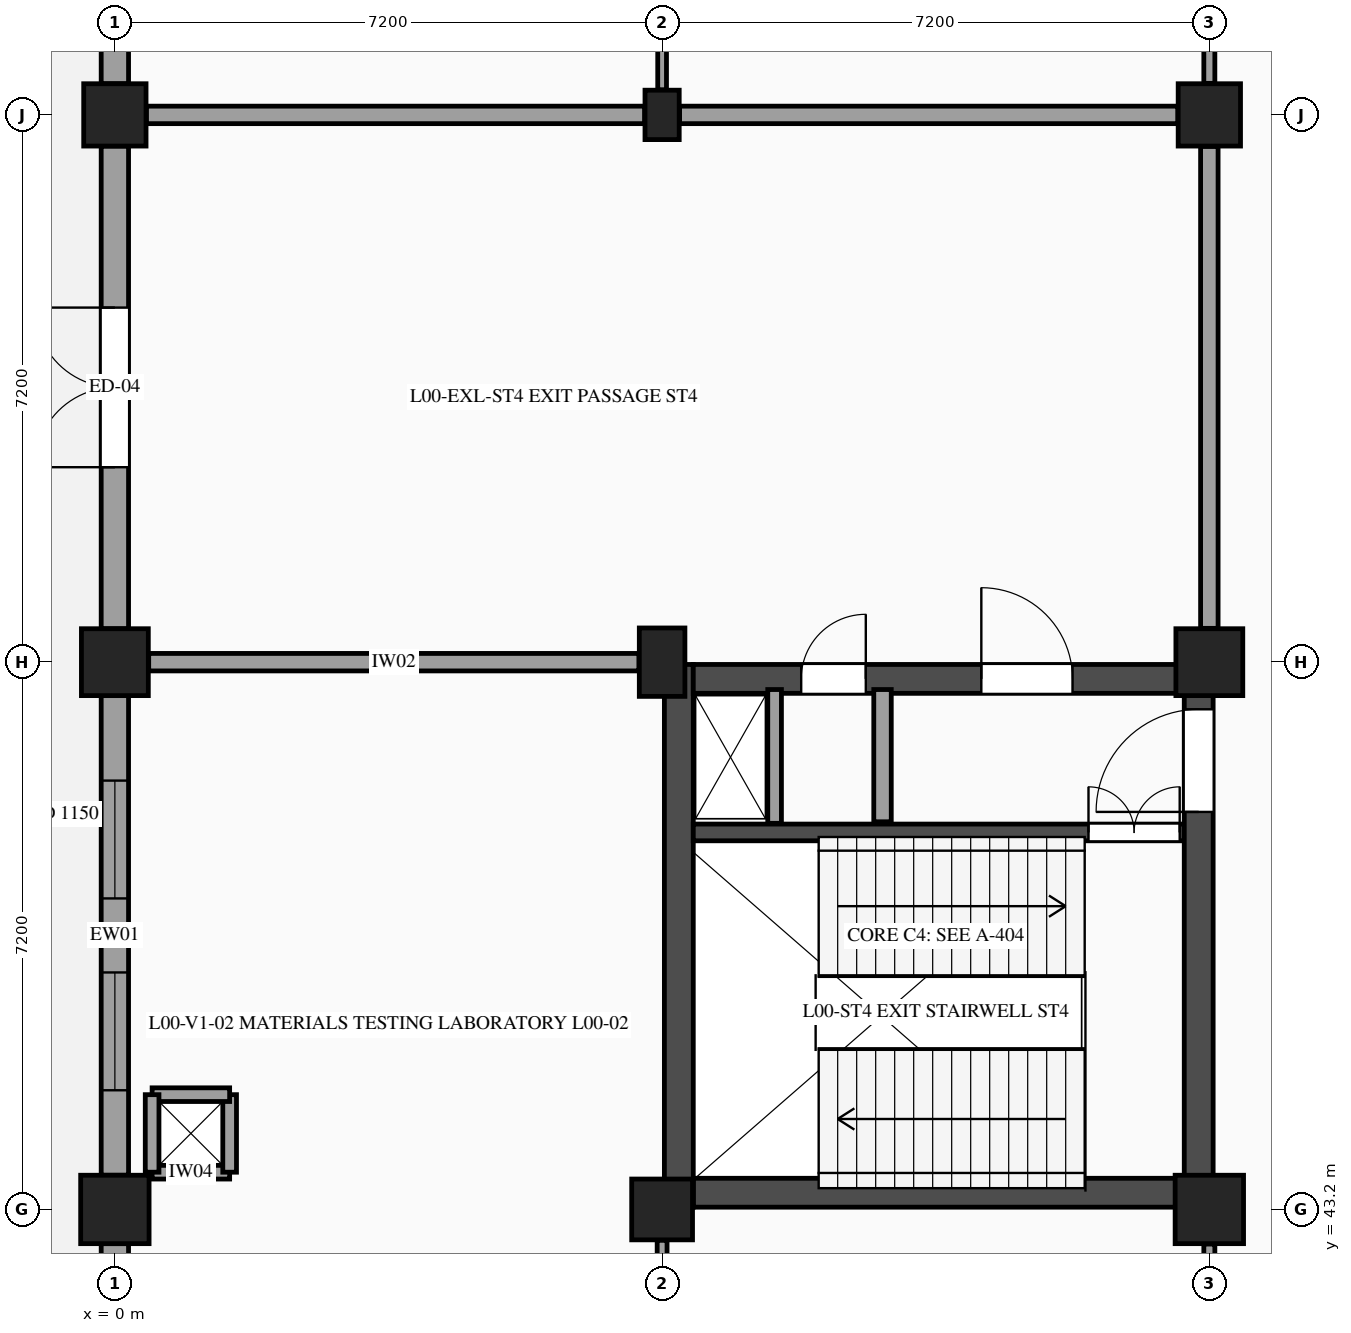
"""IFC4 building model, lengths in metres.
Left out: names, types, materials, properties, quantities, classifications, styles, units other than length and angle.
Written with IfcOpenShell. Run it as: python <this file> out.ifc"""

import sys

from ifc_helpers import new_model, si_unit, direction, frame, frame_2d, origin, origin_2d, place, context, subcontext, project, spatial, rectangle, extrude, element, fill, save


model = new_model("IFC4")
c1 = context("Model", 3, precision=1e-05, world=origin(), true_north=direction((0.0, 1.0)))
c2 = subcontext(c1, "Body", "Model", "MODEL_VIEW")
j1 = project(units=[si_unit("LENGTHUNIT", "METRE"), si_unit("PLANEANGLEUNIT", "RADIAN")], contexts=[c1])
p1 = place(None, origin())
s1 = spatial("IfcSite", under=j1, at=p1, CompositionType="ELEMENT")
p2 = place(p1, origin())
s2 = spatial("IfcBuilding", under=s1, at=p2, CompositionType="ELEMENT")
p3 = place(p2, origin())
s3 = spatial("IfcBuildingStorey", under=s2, at=p3, CompositionType="ELEMENT", Elevation=0.0)
p4 = place(p3, frame((0.0, 43.2, 0.0), z_axis=(0.0, 0.0, 1.0), x_axis=(1.0, 0.0, 0.0)))
e1 = element("IfcColumn", 1, at=p4, inside=s3, PredefinedType="COLUMN", context=c2, shape_type="SweptSolid", body=[
    extrude(rectangle(XDim=0.9, YDim=0.9, at=origin_2d()), origin(), (0.0, 0.0, 1.0), 5.4),
])
p5 = place(p3, frame((0.0, 50.4, 0.0), z_axis=(0.0, 0.0, 1.0), x_axis=(1.0, 0.0, 0.0)))
e2 = element("IfcColumn", 2, at=p5, inside=s3, PredefinedType="COLUMN", context=c2, shape_type="SweptSolid", body=[
    extrude(rectangle(XDim=0.88, YDim=0.88, at=origin_2d()), origin(), (0.0, 0.0, 1.0), 5.4),
])
p6 = place(p3, frame((0.0, 57.6, 0.0), z_axis=(0.0, 0.0, 1.0), x_axis=(1.0, 0.0, 0.0)))
e3 = element("IfcColumn", 3, at=p6, inside=s3, PredefinedType="COLUMN", context=c2, shape_type="SweptSolid", body=[
    extrude(rectangle(XDim=0.82, YDim=0.82, at=origin_2d()), origin(), (0.0, 0.0, 1.0), 5.4),
])
p7 = place(p3, frame((7.2, 43.2, 0.0), z_axis=(0.0, 0.0, 1.0), x_axis=(1.0, 0.0, 0.0)))
e4 = element("IfcColumn", 4, at=p7, inside=s3, PredefinedType="COLUMN", context=c2, shape_type="SweptSolid", body=[
    extrude(rectangle(XDim=0.8, YDim=0.8, at=origin_2d()), origin(), (0.0, 0.0, 1.0), 5.4),
])
p8 = place(p3, frame((7.2, 50.4, 0.0), z_axis=(0.0, 0.0, 1.0), x_axis=(1.0, 0.0, 0.0)))
e5 = element("IfcColumn", 5, at=p8, inside=s3, PredefinedType="COLUMN", context=c2, shape_type="SweptSolid", body=[
    extrude(rectangle(XDim=0.6, YDim=0.9, at=origin_2d()), origin(), (0.0, 0.0, 1.0), 5.4),
])
p9 = place(p3, frame((7.2, 57.6, 0.0), z_axis=(0.0, 0.0, 1.0), x_axis=(1.0, 0.0, 0.0)))
e6 = element("IfcColumn", 6, at=p9, inside=s3, PredefinedType="PILASTER", context=c2, shape_type="SweptSolid", body=[
    extrude(rectangle(XDim=0.45, YDim=0.65, at=origin_2d()), origin(), (0.0, 0.0, 1.0), 5.4),
])
p10 = place(p3, frame((14.4, 43.2, 0.0), z_axis=(0.0, 0.0, 1.0), x_axis=(1.0, 0.0, 0.0)))
e7 = element("IfcColumn", 7, at=p10, inside=s3, PredefinedType="COLUMN", context=c2, shape_type="SweptSolid", body=[
    extrude(rectangle(XDim=0.9, YDim=0.9, at=origin_2d()), origin(), (0.0, 0.0, 1.0), 5.4),
])
p11 = place(p3, frame((14.4, 50.4, 0.0), z_axis=(0.0, 0.0, 1.0), x_axis=(1.0, 0.0, 0.0)))
e8 = element("IfcColumn", 8, at=p11, inside=s3, PredefinedType="COLUMN", context=c2, shape_type="SweptSolid", body=[
    extrude(rectangle(XDim=0.88, YDim=0.88, at=origin_2d()), origin(), (0.0, 0.0, 1.0), 5.4),
])
p12 = place(p3, frame((14.4, 57.6, 0.0), z_axis=(0.0, 0.0, 1.0), x_axis=(1.0, 0.0, 0.0)))
e9 = element("IfcColumn", 9, at=p12, inside=s3, PredefinedType="COLUMN", context=c2, shape_type="SweptSolid", body=[
    extrude(rectangle(XDim=0.82, YDim=0.82, at=origin_2d()), origin(), (0.0, 0.0, 1.0), 5.4),
])
p13 = place(p3, frame((0.0, 36.325, 0.0), z_axis=(0.0, 0.0, 1.0), x_axis=(0.0, 1.0, 0.0)))
e10 = element("IfcWall", 10, at=p13, inside=s3, PredefinedType="STANDARD", context=c2, shape_type="SweptSolid", body=[
    extrude(rectangle(XDim=6.425, YDim=0.36, at=frame_2d((3.212, 0.0))), origin(), (0.0, 0.0, 1.0), 4.335),
])
p14 = place(p13, frame((2.163, 0.0, 0.0)))
e11 = element("IfcOpeningElement", 11, at=p14, cuts=e10, PredefinedType="OPENING", context=c2, shape_type="SweptSolid", body=[
    extrude(rectangle(XDim=2.1, YDim=2.4, at=frame_2d((1.05, 1.2))), frame((0.0, 0.19, 0.0), z_axis=(0.0, -1.0, 0.0), x_axis=(1.0, 0.0, 0.0)), (0.0, 0.0, 1.0), 0.38),
])
p15 = place(p3, frame((0.0, 43.65, 0.0), z_axis=(0.0, 0.0, 1.0), x_axis=(0.0, 1.0, 0.0)))
e12 = element("IfcWall", 12, at=p15, inside=s3, PredefinedType="STANDARD", context=c2, shape_type="SweptSolid", body=[
    extrude(rectangle(XDim=6.31, YDim=0.36, at=frame_2d((3.155, 0.0))), origin(), (0.0, 0.0, 1.0), 4.335),
])
p16 = place(p15, frame((1.118, 0.0, 1.15)))
e13 = element("IfcOpeningElement", 13, at=p16, cuts=e12, PredefinedType="OPENING", context=c2, shape_type="SweptSolid", body=[
    extrude(rectangle(XDim=1.55, YDim=1.35, at=frame_2d((0.775, 0.675))), frame((0.0, 0.19, 0.0), z_axis=(0.0, -1.0, 0.0), x_axis=(1.0, 0.0, 0.0)), (0.0, 0.0, 1.0), 0.38),
])
p17 = place(p15, frame((3.642, 0.0, 1.15)))
e14 = element("IfcOpeningElement", 14, at=p17, cuts=e12, PredefinedType="OPENING", context=c2, shape_type="SweptSolid", body=[
    extrude(rectangle(XDim=1.55, YDim=1.35, at=frame_2d((0.775, 0.675))), frame((0.0, 0.19, 0.0), z_axis=(0.0, -1.0, 0.0), x_axis=(1.0, 0.0, 0.0)), (0.0, 0.0, 1.0), 0.38),
])
p18 = place(p3, frame((0.0, 50.84, 0.0), z_axis=(0.0, 0.0, 1.0), x_axis=(0.0, 1.0, 0.0)))
e15 = element("IfcWall", 15, at=p18, inside=s3, PredefinedType="STANDARD", context=c2, shape_type="SweptSolid", body=[
    extrude(rectangle(XDim=6.35, YDim=0.36, at=frame_2d((3.175, 0.0))), origin(), (0.0, 0.0, 1.0), 4.335),
])
p19 = place(p18, frame((2.125, 0.0, 0.0)))
e16 = element("IfcOpeningElement", 16, at=p19, cuts=e15, PredefinedType="OPENING", context=c2, shape_type="SweptSolid", body=[
    extrude(rectangle(XDim=2.1, YDim=2.4, at=frame_2d((1.05, 1.2))), frame((0.0, 0.19, 0.0), z_axis=(0.0, -1.0, 0.0), x_axis=(1.0, 0.0, 0.0)), (0.0, 0.0, 1.0), 0.38),
])
p20 = place(p3, frame((0.0, 58.01, 0.0), z_axis=(0.0, 0.0, 1.0), x_axis=(0.0, 1.0, 0.0)))
e17 = element("IfcWall", 17, at=p20, inside=s3, PredefinedType="STANDARD", context=c2, shape_type="SweptSolid", body=[
    extrude(rectangle(XDim=6.39, YDim=0.36, at=frame_2d((3.195, 0.0))), origin(), (0.0, 0.0, 1.0), 4.335),
])
p21 = place(p20, frame((1.292, 0.0, 1.15)))
e18 = element("IfcOpeningElement", 18, at=p21, cuts=e17, PredefinedType="OPENING", context=c2, shape_type="SweptSolid", body=[
    extrude(rectangle(XDim=1.25, YDim=1.25, at=frame_2d((0.625, 0.625))), frame((0.0, 0.19, 0.0), z_axis=(0.0, -1.0, 0.0), x_axis=(1.0, 0.0, 0.0)), (0.0, 0.0, 1.0), 0.38),
])
p22 = place(p20, frame((3.848, 0.0, 1.15)))
e19 = element("IfcOpeningElement", 19, at=p22, cuts=e17, PredefinedType="OPENING", context=c2, shape_type="SweptSolid", body=[
    extrude(rectangle(XDim=1.25, YDim=1.25, at=frame_2d((0.625, 0.625))), frame((0.0, 0.19, 0.0), z_axis=(0.0, -1.0, 0.0), x_axis=(1.0, 0.0, 0.0)), (0.0, 0.0, 1.0), 0.38),
])
p23 = place(p3, frame((7.61, 43.42, 0.0), z_axis=(0.0, 0.0, 1.0), x_axis=(1.0, 0.0, 0.0)))
e20 = element("IfcWall", 20, at=p23, inside=s3, PredefinedType="SHEAR", context=c2, shape_type="SweptSolid", body=[
    extrude(rectangle(XDim=6.46, YDim=0.38, at=frame_2d((3.23, 0.0))), origin(), (0.0, 0.0, 1.0), 5.09),
])
p24 = place(p3, frame((7.42, 50.37, 0.0), z_axis=(0.0, 0.0, 1.0), x_axis=(0.0, -1.0, 0.0)))
e21 = element("IfcWall", 21, at=p24, inside=s3, PredefinedType="SHEAR", context=c2, shape_type="SweptSolid", body=[
    extrude(rectangle(XDim=7.14, YDim=0.38, at=frame_2d((3.57, 0.0))), origin(), (0.0, 0.0, 1.0), 5.09),
])
p25 = place(p3, frame((7.61, 50.18, 0.0), z_axis=(0.0, 0.0, 1.0), x_axis=(1.0, 0.0, 0.0)))
e22 = element("IfcWall", 22, at=p25, inside=s3, PredefinedType="SHEAR", context=c2, shape_type="SweptSolid", body=[
    extrude(rectangle(XDim=6.46, YDim=0.38, at=frame_2d((3.23, 0.0))), origin(), (0.0, 0.0, 1.0), 5.09),
])
p26 = place(p25, frame((1.42, 0.0, 0.0)))
e23 = element("IfcOpeningElement", 23, at=p26, cuts=e22, PredefinedType="OPENING", context=c2, shape_type="SweptSolid", body=[
    extrude(rectangle(XDim=0.85, YDim=2.1, at=frame_2d((0.425, 1.05))), frame((0.0, 0.2, 0.0), z_axis=(0.0, -1.0, 0.0), x_axis=(1.0, 0.0, 0.0)), (0.0, 0.0, 1.0), 0.4),
])
p27 = place(p25, frame((3.79, 0.0, 0.0)))
e24 = element("IfcOpeningElement", 24, at=p27, cuts=e22, PredefinedType="OPENING", context=c2, shape_type="SweptSolid", body=[
    extrude(rectangle(XDim=1.2, YDim=2.2, at=frame_2d((0.6, 1.1))), frame((0.0, 0.2, 0.0), z_axis=(0.0, -1.0, 0.0), x_axis=(1.0, 0.0, 0.0)), (0.0, 0.0, 1.0), 0.4),
])
p28 = place(p3, frame((7.61, 48.16, 0.0), z_axis=(0.0, 0.0, 1.0), x_axis=(1.0, 0.0, 0.0)))
e25 = element("IfcWall", 25, at=p28, inside=s3, PredefinedType="SHEAR", context=c2, shape_type="SweptSolid", body=[
    extrude(rectangle(XDim=6.46, YDim=0.22, at=frame_2d((3.23, 0.0))), origin(), (0.0, 0.0, 1.0), 5.09),
])
p29 = place(p28, frame((5.2, 0.0, 0.0)))
e26 = element("IfcOpeningElement", 26, at=p29, cuts=e25, PredefinedType="OPENING", context=c2, shape_type="SweptSolid", body=[
    extrude(rectangle(XDim=1.2, YDim=2.2, at=frame_2d((0.6, 1.1))), frame((0.0, 0.12, 0.0), z_axis=(0.0, -1.0, 0.0), x_axis=(1.0, 0.0, 0.0)), (0.0, 0.0, 1.0), 0.24),
])
p30 = place(p3, frame((10.1, 48.3, 0.0), z_axis=(0.0, 0.0, 1.0), x_axis=(0.0, 1.0, 0.0)))
e27 = element("IfcWall", 27, at=p30, inside=s3, PredefinedType="PARTITIONING", context=c2, shape_type="SweptSolid", body=[
    extrude(rectangle(XDim=1.74, YDim=0.23, at=frame_2d((0.87, 0.0))), origin(), (0.0, 0.0, 1.0), 5.09),
])
p31 = place(p3, frame((8.68, 48.28, 0.0), z_axis=(0.0, 0.0, 1.0), x_axis=(0.0, 1.0, 0.0)))
e28 = element("IfcWall", 28, at=p31, inside=s3, PredefinedType="PARTITIONING", context=c2, shape_type="SweptSolid", body=[
    extrude(rectangle(XDim=1.76, YDim=0.18, at=frame_2d((0.88, 0.0))), origin(), (0.0, 0.0, 1.0), 5.09),
])
p32 = place(p3, frame((14.26, 43.23, 0.0), z_axis=(0.0, 0.0, 1.0), x_axis=(0.0, 1.0, 0.0)))
e29 = element("IfcWall", 29, at=p32, inside=s3, PredefinedType="SHEAR", context=c2, shape_type="SweptSolid", body=[
    extrude(rectangle(XDim=7.14, YDim=0.38, at=frame_2d((3.57, 0.0))), origin(), (0.0, 0.0, 1.0), 5.09),
])
p33 = place(p32, frame((5.2, 0.0, 0.0)))
e30 = element("IfcOpeningElement", 30, at=p33, cuts=e29, PredefinedType="OPENING", context=c2, shape_type="SweptSolid", body=[
    extrude(rectangle(XDim=1.35, YDim=2.15, at=frame_2d((0.675, 1.075))), frame((0.0, 0.2, 0.0), z_axis=(0.0, -1.0, 0.0), x_axis=(1.0, 0.0, 0.0)), (0.0, 0.0, 1.0), 0.4),
])
for number, where, z_axis, x_axis in (
    (31, (0.49, 43.69, 0.0), (0.0, 0.0, 1.0), (1.0, 0.0, 0.0)),
    (32, (1.51, 43.69, 0.0), (0.0, 0.0, 1.0), (0.0, 1.0, 0.0)),
    (33, (1.51, 44.71, 0.0), (0.0, 0.0, 1.0), (-1.0, 0.0, 0.0)),
    (34, (0.49, 44.71, 0.0), (0.0, 0.0, 1.0), (0.0, -1.0, 0.0)),
):
    element("IfcWall", number, at=place(p3, frame(where, z_axis=z_axis, x_axis=x_axis)), inside=s3, PredefinedType="PARTITIONING", context=c2, shape_type="SweptSolid", body=[
        extrude(rectangle(XDim=1.02, YDim=0.18, at=frame_2d((0.51, 0.0))), origin(), (0.0, 0.0, 1.0), 5.09),
    ])
p34 = place(p3, frame((7.2, 36.415, 0.0), z_axis=(0.0, 0.0, 1.0), x_axis=(0.0, 1.0, 0.0)))
e35 = element("IfcWall", 35, at=p34, inside=s3, PredefinedType="PARTITIONING", context=c2, shape_type="SweptSolid", body=[
    extrude(rectangle(XDim=6.38, YDim=0.13, at=frame_2d((3.19, 0.0))), origin(), (0.0, 0.0, 1.0), 4.395),
])
p35 = place(p34, frame((2.5, 0.0, 0.0)))
e36 = element("IfcOpeningElement", 36, at=p35, cuts=e35, PredefinedType="OPENING", context=c2, shape_type="SweptSolid", body=[
    extrude(rectangle(XDim=1.38, YDim=2.22, at=frame_2d((0.69, 1.11))), frame((0.0, 0.075, 0.0), z_axis=(0.0, -1.0, 0.0), x_axis=(1.0, 0.0, 0.0)), (0.0, 0.0, 1.0), 0.15),
])
p36 = place(p3, frame((0.445, 50.4, 0.0), z_axis=(0.0, 0.0, 1.0), x_axis=(1.0, 0.0, 0.0)))
e37 = element("IfcWall", 37, at=p36, inside=s3, PredefinedType="PARTITIONING", context=c2, shape_type="SweptSolid", body=[
    extrude(rectangle(XDim=6.45, YDim=0.23, at=frame_2d((3.225, 0.0))), origin(), (0.0, 0.0, 1.0), 4.31),
])
p37 = place(p3, frame((0.415, 57.6, 0.0), z_axis=(0.0, 0.0, 1.0), x_axis=(1.0, 0.0, 0.0)))
e38 = element("IfcWall", 38, at=p37, inside=s3, PredefinedType="PARTITIONING", context=c2, shape_type="SweptSolid", body=[
    extrude(rectangle(XDim=6.555, YDim=0.23, at=frame_2d((3.277, 0.0))), origin(), (0.0, 0.0, 1.0), 4.31),
])
p38 = place(p3, frame((7.2, 57.93, 0.0), z_axis=(0.0, 0.0, 1.0), x_axis=(0.0, 1.0, 0.0)))
e39 = element("IfcWall", 39, at=p38, inside=s3, PredefinedType="PARTITIONING", context=c2, shape_type="SweptSolid", body=[
    extrude(rectangle(XDim=6.415, YDim=0.115, at=frame_2d((3.208, 0.0))), origin(), (0.0, 0.0, 1.0), 4.405),
])
p39 = place(p38, frame((2.617, 0.0, 0.0)))
e40 = element("IfcOpeningElement", 40, at=p39, cuts=e39, PredefinedType="OPENING", context=c2, shape_type="SweptSolid", body=[
    extrude(rectangle(XDim=1.18, YDim=2.18, at=frame_2d((0.59, 1.09))), frame((0.0, 0.067, 0.0), z_axis=(0.0, -1.0, 0.0), x_axis=(1.0, 0.0, 0.0)), (0.0, 0.0, 1.0), 0.135),
])
p40 = place(p3, frame((14.4, 36.33, 0.0), z_axis=(0.0, 0.0, 1.0), x_axis=(0.0, 1.0, 0.0)))
e41 = element("IfcWall", 41, at=p40, inside=s3, PredefinedType="PARTITIONING", context=c2, shape_type="SweptSolid", body=[
    extrude(rectangle(XDim=6.415, YDim=0.145, at=frame_2d((3.208, 0.0))), origin(), (0.0, 0.0, 1.0), 4.395),
])
p41 = place(p40, frame((2.248, 0.0, 0.0)))
e42 = element("IfcOpeningElement", 42, at=p41, cuts=e41, PredefinedType="OPENING", context=c2, shape_type="SweptSolid", body=[
    extrude(rectangle(XDim=1.92, YDim=2.35, at=frame_2d((0.96, 1.175))), frame((0.0, 0.083, 0.0), z_axis=(0.0, -1.0, 0.0), x_axis=(1.0, 0.0, 0.0)), (0.0, 0.0, 1.0), 0.165),
])
p42 = place(p3, frame((14.4, 50.845, 0.0), z_axis=(0.0, 0.0, 1.0), x_axis=(0.0, 1.0, 0.0)))
e43 = element("IfcWall", 43, at=p42, inside=s3, PredefinedType="PARTITIONING", context=c2, shape_type="SweptSolid", body=[
    extrude(rectangle(XDim=6.34, YDim=0.23, at=frame_2d((3.17, 0.0))), origin(), (0.0, 0.0, 1.0), 4.455),
])
p43 = place(p3, frame((7.43, 57.6, 0.0), z_axis=(0.0, 0.0, 1.0), x_axis=(1.0, 0.0, 0.0)))
e44 = element("IfcWall", 44, at=p43, inside=s3, PredefinedType="PARTITIONING", context=c2, shape_type="SweptSolid", body=[
    extrude(rectangle(XDim=6.555, YDim=0.23, at=frame_2d((3.278, 0.0))), origin(), (0.0, 0.0, 1.0), 4.34),
])
p44 = place(p3, frame((14.4, 58.015, 0.0), z_axis=(0.0, 0.0, 1.0), x_axis=(0.0, 1.0, 0.0)))
e45 = element("IfcWall", 45, at=p44, inside=s3, PredefinedType="PARTITIONING", context=c2, shape_type="SweptSolid", body=[
    extrude(rectangle(XDim=6.38, YDim=0.145, at=frame_2d((3.19, 0.0))), origin(), (0.0, 0.0, 1.0), 4.405),
])
p45 = place(p44, frame((2.31, 0.0, 0.0)))
e46 = element("IfcOpeningElement", 46, at=p45, cuts=e45, PredefinedType="OPENING", context=c2, shape_type="SweptSolid", body=[
    extrude(rectangle(XDim=1.76, YDim=2.3, at=frame_2d((0.88, 1.15))), frame((0.0, 0.083, 0.0), z_axis=(0.0, -1.0, 0.0), x_axis=(1.0, 0.0, 0.0)), (0.0, 0.0, 1.0), 0.165),
])
p46 = place(p16, origin())
e47 = element("IfcWindow", 47, at=p46, inside=s3, PartitioningType="SINGLE_PANEL", PredefinedType="WINDOW", context=c2, shape_type="SweptSolid", body=[
    extrude(rectangle(XDim=1.55, YDim=1.35, at=frame_2d((0.775, 0.675))), frame((0.0, -0.08, 0.0), z_axis=(0.0, -1.0, 0.0), x_axis=(1.0, 0.0, 0.0)), (0.0, 0.0, 1.0), 0.06),
])
fill(e13, e47)
p47 = place(p17, origin())
e48 = element("IfcWindow", 48, at=p47, inside=s3, PartitioningType="SINGLE_PANEL", PredefinedType="WINDOW", context=c2, shape_type="SweptSolid", body=[
    extrude(rectangle(XDim=1.55, YDim=1.35, at=frame_2d((0.775, 0.675))), frame((0.0, -0.08, 0.0), z_axis=(0.0, -1.0, 0.0), x_axis=(1.0, 0.0, 0.0)), (0.0, 0.0, 1.0), 0.06),
])
fill(e14, e48)
p48 = place(p19, origin())
e49 = element("IfcDoor", 49, at=p48, inside=s3, OperationType="DOUBLE_DOOR_SINGLE_SWING", PredefinedType="DOOR", context=c2, shape_type="SweptSolid", body=[
    extrude(rectangle(XDim=2.1, YDim=2.4, at=frame_2d((1.05, 1.2))), frame((0.0, 0.025, 0.0), z_axis=(0.0, -1.0, 0.0), x_axis=(1.0, 0.0, 0.0)), (0.0, 0.0, 1.0), 0.05),
])
fill(e16, e49)
p49 = place(p26, origin())
e50 = element("IfcDoor", 50, at=p49, inside=s3, OperationType="SINGLE_SWING_RIGHT", PredefinedType="DOOR", context=c2, shape_type="SweptSolid", body=[
    extrude(rectangle(XDim=0.85, YDim=2.1, at=frame_2d((0.425, 1.05))), frame((0.0, 0.025, 0.0), z_axis=(0.0, -1.0, 0.0), x_axis=(1.0, 0.0, 0.0)), (0.0, 0.0, 1.0), 0.05),
])
fill(e23, e50)
p50 = place(p27, origin())
e51 = element("IfcDoor", 51, at=p50, inside=s3, OperationType="SINGLE_SWING_LEFT", PredefinedType="DOOR", context=c2, shape_type="SweptSolid", body=[
    extrude(rectangle(XDim=1.2, YDim=2.2, at=frame_2d((0.6, 1.1))), frame((0.0, 0.025, 0.0), z_axis=(0.0, -1.0, 0.0), x_axis=(1.0, 0.0, 0.0)), (0.0, 0.0, 1.0), 0.05),
])
fill(e24, e51)
p51 = place(p29, frame((1.2, 0.0, 0.0), z_axis=(0.0, 0.0, 1.0), x_axis=(-1.0, 0.0, 0.0)))
e52 = element("IfcDoor", 52, at=p51, inside=s3, OperationType="DOUBLE_DOOR_SINGLE_SWING", PredefinedType="DOOR", context=c2, shape_type="SweptSolid", body=[
    extrude(rectangle(XDim=1.2, YDim=2.2, at=frame_2d((0.6, 1.1))), frame((0.0, 0.025, 0.0), z_axis=(0.0, -1.0, 0.0), x_axis=(1.0, 0.0, 0.0)), (0.0, 0.0, 1.0), 0.05),
])
fill(e26, e52)
p52 = place(p33, frame((1.35, 0.0, 0.0), z_axis=(0.0, 0.0, 1.0), x_axis=(-1.0, 0.0, 0.0)))
e53 = element("IfcDoor", 53, at=p52, inside=s3, OperationType="SINGLE_SWING_LEFT", PredefinedType="DOOR", context=c2, shape_type="SweptSolid", body=[
    extrude(rectangle(XDim=1.35, YDim=2.15, at=frame_2d((0.675, 1.075))), frame((0.0, 0.025, 0.0), z_axis=(0.0, -1.0, 0.0), x_axis=(1.0, 0.0, 0.0)), (0.0, 0.0, 1.0), 0.05),
])
fill(e30, e53)
save(model, sys.argv[1])
